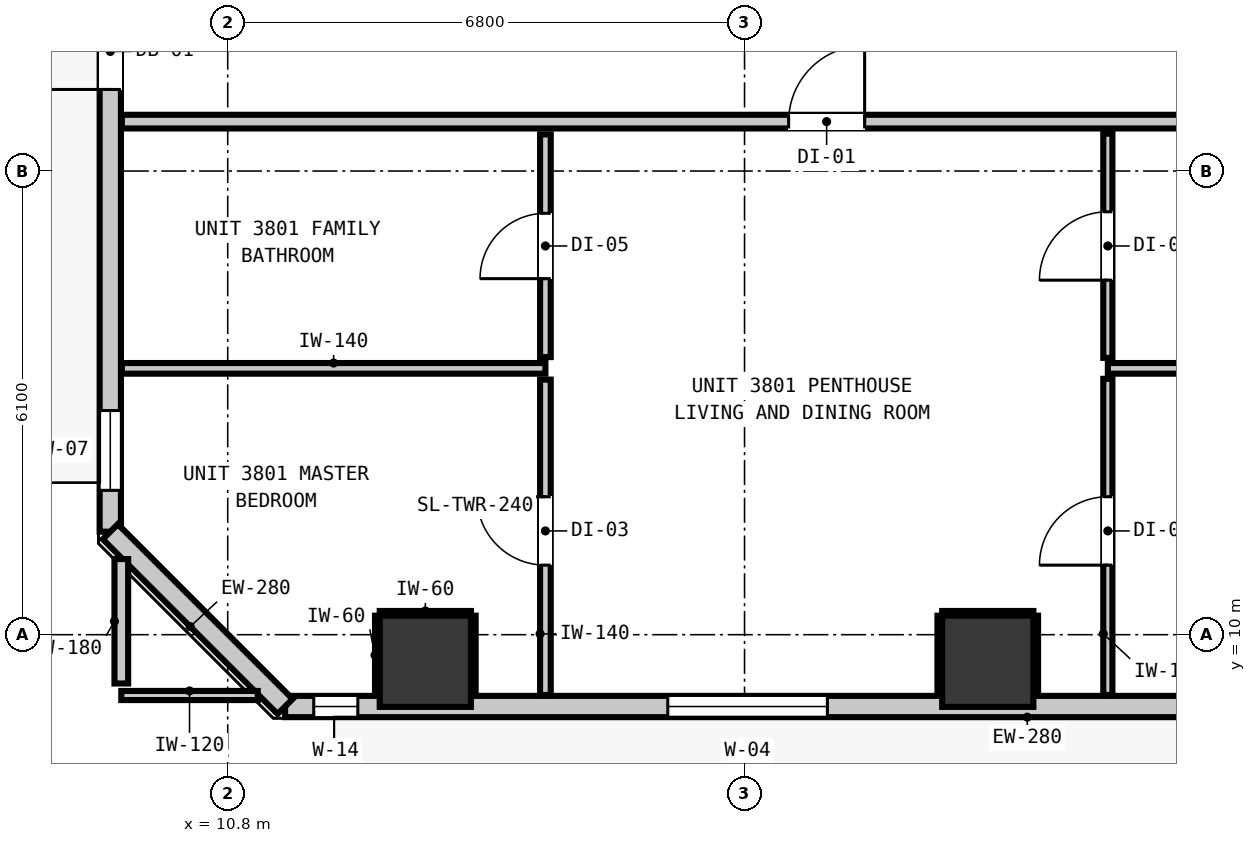
"""IFC4 building model, lengths in metres.
Left out: names, types, materials, properties, quantities, classifications, styles, units other than length and angle.
Written with IfcOpenShell. Run it as: python <this file> out.ifc"""

import sys

from ifc_helpers import new_model, si_unit, direction, frame, frame_2d, origin, origin_2d, place, context, subcontext, project, spatial, rectangle, extrude, element, fill, save


model = new_model("IFC4")
c1 = context("Model", 3, precision=1e-05, world=origin(), true_north=direction((0.0, 1.0)))
c2 = subcontext(c1, "Body", "Model", "MODEL_VIEW")
j1 = project(units=[si_unit("LENGTHUNIT", "METRE"), si_unit("PLANEANGLEUNIT", "RADIAN")], contexts=[c1])
p1 = place(None, origin())
s1 = spatial("IfcSite", under=j1, at=p1, CompositionType="ELEMENT")
p2 = place(p1, origin())
s2 = spatial("IfcBuilding", under=s1, at=p2, CompositionType="ELEMENT")
p3 = place(p2, frame((0.0, 0.0, 132.64)))
s3 = spatial("IfcBuildingStorey", under=s2, at=p3, CompositionType="ELEMENT", Elevation=132.64)
for number, where, z_axis, x_axis in (
    (1, (13.4, 9.65, 0.0), (0.0, 0.0, 1.0), (1.0, 0.0, 0.0)),
    (2, (20.8, 9.65, 0.0), (0.0, 0.0, 1.0), (1.0, 0.0, 0.0)),
):
    element("IfcColumn", number, at=place(p3, frame(where, z_axis=z_axis, x_axis=x_axis)), inside=s3, PredefinedType="COLUMN", context=c2, shape_type="SweptSolid", body=[
        extrude(rectangle(XDim=1.2, YDim=1.2, at=origin_2d()), origin(), (0.0, 0.0, 1.0), 3.32),
    ])
p4 = place(p3, frame((9.255, 11.355, 0.0), z_axis=(0.0, 0.0, 1.0), x_axis=(0.0, 1.0, 0.0)))
e3 = element("IfcWall", 3, at=p4, inside=s3, PredefinedType="STANDARD", context=c2, shape_type="SweptSolid", body=[
    extrude(rectangle(XDim=32.29, YDim=0.28, at=frame_2d((16.145, 0.0))), origin(), (0.0, 0.0, 1.0), 3.08),
])
p5 = place(p4, frame((5.818, 0.0, 0.0)))
e4 = element("IfcOpeningElement", 4, at=p5, cuts=e3, PredefinedType="OPENING", context=c2, shape_type="SweptSolid", body=[
    extrude(rectangle(XDim=1.0, YDim=2.15, at=frame_2d((0.5, 1.075))), frame((0.0, 0.15, 0.0), z_axis=(0.0, -1.0, 0.0), x_axis=(1.0, 0.0, 0.0)), (0.0, 0.0, 1.0), 0.3),
])
p6 = place(p4, frame((0.544, 0.0, 0.85)))
e5 = element("IfcOpeningElement", 5, at=p6, cuts=e3, PredefinedType="OPENING", context=c2, shape_type="SweptSolid", body=[
    extrude(rectangle(XDim=1.05, YDim=1.65, at=frame_2d((0.525, 0.825))), frame((0.0, 0.15, 0.0), z_axis=(0.0, -1.0, 0.0), x_axis=(1.0, 0.0, 0.0)), (0.0, 0.0, 1.0), 0.3),
])
p7 = place(p3, frame((46.645, 9.055, 0.0), z_axis=(0.0, 0.0, 1.0), x_axis=(-1.0, 0.0, 0.0)))
e6 = element("IfcWall", 6, at=p7, inside=s3, PredefinedType="STANDARD", context=c2, shape_type="SweptSolid", body=[
    extrude(rectangle(XDim=35.09, YDim=0.28, at=frame_2d((17.545, 0.0))), origin(), (0.0, 0.0, 1.0), 3.08),
])
p8 = place(p7, frame((0.904, 0.0, 0.0)))
e7 = element("IfcOpeningElement", 7, at=p8, cuts=e6, PredefinedType="OPENING", context=c2, shape_type="SweptSolid", body=[
    extrude(rectangle(XDim=1.0, YDim=2.15, at=frame_2d((0.5, 1.075))), frame((0.0, 0.15, 0.0), z_axis=(0.0, -1.0, 0.0), x_axis=(1.0, 0.0, 0.0)), (0.0, 0.0, 1.0), 0.3),
])
p9 = place(p7, frame((27.955, 0.0, 0.85)))
e8 = element("IfcOpeningElement", 8, at=p9, cuts=e6, PredefinedType="OPENING", context=c2, shape_type="SweptSolid", body=[
    extrude(rectangle(XDim=2.1, YDim=1.9, at=frame_2d((1.05, 0.95))), frame((0.0, 0.15, 0.0), z_axis=(0.0, -1.0, 0.0), x_axis=(1.0, 0.0, 0.0)), (0.0, 0.0, 1.0), 0.3),
])
p10 = place(p7, frame((34.133, 0.0, 0.85)))
e9 = element("IfcOpeningElement", 9, at=p10, cuts=e6, PredefinedType="OPENING", context=c2, shape_type="SweptSolid", body=[
    extrude(rectangle(XDim=0.58, YDim=1.5, at=frame_2d((0.29, 0.75))), frame((0.0, 0.15, 0.0), z_axis=(0.0, -1.0, 0.0), x_axis=(1.0, 0.0, 0.0)), (0.0, 0.0, 1.0), 0.3),
])
p11 = place(p7, frame((20.595, 0.0, 0.85)))
e10 = element("IfcOpeningElement", 10, at=p11, cuts=e6, PredefinedType="OPENING", context=c2, shape_type="SweptSolid", body=[
    extrude(rectangle(XDim=2.1, YDim=1.9, at=frame_2d((1.05, 0.95))), frame((0.0, 0.15, 0.0), z_axis=(0.0, -1.0, 0.0), x_axis=(1.0, 0.0, 0.0)), (0.0, 0.0, 1.0), 0.3),
])
p12 = place(p7, frame((15.248, 0.0, 0.85)))
e11 = element("IfcOpeningElement", 11, at=p12, cuts=e6, PredefinedType="OPENING", context=c2, shape_type="SweptSolid", body=[
    extrude(rectangle(XDim=1.05, YDim=1.65, at=frame_2d((0.525, 0.825))), frame((0.0, 0.15, 0.0), z_axis=(0.0, -1.0, 0.0), x_axis=(1.0, 0.0, 0.0)), (0.0, 0.0, 1.0), 0.3),
])
p13 = place(p7, frame((4.752, 0.0, 0.85)))
e12 = element("IfcOpeningElement", 12, at=p13, cuts=e6, PredefinedType="OPENING", context=c2, shape_type="SweptSolid", body=[
    extrude(rectangle(XDim=2.1, YDim=1.9, at=frame_2d((1.05, 0.95))), frame((0.0, 0.15, 0.0), z_axis=(0.0, -1.0, 0.0), x_axis=(1.0, 0.0, 0.0)), (0.0, 0.0, 1.0), 0.3),
])
p14 = place(p7, frame((11.573, 0.0, 0.85)))
e13 = element("IfcOpeningElement", 13, at=p14, cuts=e6, PredefinedType="OPENING", context=c2, shape_type="SweptSolid", body=[
    extrude(rectangle(XDim=2.1, YDim=1.9, at=frame_2d((1.05, 0.95))), frame((0.0, 0.15, 0.0), z_axis=(0.0, -1.0, 0.0), x_axis=(1.0, 0.0, 0.0)), (0.0, 0.0, 1.0), 0.3),
])
p15 = place(p3, frame((11.555, 9.055, 0.0), z_axis=(0.0, 0.0, 1.0), x_axis=(-0.707106781187, 0.707106781187, 0.0)))
e14 = element("IfcWall", 14, at=p15, inside=s3, PredefinedType="STANDARD", context=c2, shape_type="SweptSolid", body=[
    extrude(rectangle(XDim=3.253, YDim=0.28, at=frame_2d((1.626, 0.0))), origin(), (0.0, 0.0, 1.0), 3.08),
])
p16 = place(p3, frame((9.407, 16.75, 0.0), z_axis=(0.0, 0.0, 1.0), x_axis=(1.0, 0.0, 0.0)))
e15 = element("IfcWall", 15, at=p16, inside=s3, PredefinedType="PARTITIONING", context=c2, shape_type="SweptSolid", body=[
    extrude(rectangle(XDim=39.386, YDim=0.18, at=frame_2d((19.693, 0.0))), origin(), (0.0, 0.0, 1.0), 3.08),
])
p17 = place(p16, frame((8.773, 0.0, 0.0)))
e16 = element("IfcOpeningElement", 16, at=p17, cuts=e15, PredefinedType="OPENING", context=c2, shape_type="SweptSolid", body=[
    extrude(rectangle(XDim=1.0, YDim=2.15, at=frame_2d((0.5, 1.075))), frame((0.0, 0.1, 0.0), z_axis=(0.0, -1.0, 0.0), x_axis=(1.0, 0.0, 0.0)), (0.0, 0.0, 1.0), 0.2),
])
p18 = place(p16, frame((30.936, 0.0, 0.0)))
e17 = element("IfcOpeningElement", 17, at=p18, cuts=e15, PredefinedType="OPENING", context=c2, shape_type="SweptSolid", body=[
    extrude(rectangle(XDim=1.0, YDim=2.15, at=frame_2d((0.5, 1.075))), frame((0.0, 0.1, 0.0), z_axis=(0.0, -1.0, 0.0), x_axis=(1.0, 0.0, 0.0)), (0.0, 0.0, 1.0), 0.2),
])
p19 = place(p3, frame((9.407, 13.504, 0.0), z_axis=(0.0, 0.0, 1.0), x_axis=(1.0, 0.0, 0.0)))
e18 = element("IfcWall", 18, at=p19, inside=s3, PredefinedType="PARTITIONING", context=c2, shape_type="SweptSolid", body=[
    extrude(rectangle(XDim=5.573, YDim=0.14, at=frame_2d((2.787, 0.0))), origin(), (0.0, 0.0, 1.0), 3.08),
])
p20 = place(p3, frame((22.38, 13.504, 0.0), z_axis=(0.0, 0.0, 1.0), x_axis=(1.0, 0.0, 0.0)))
e19 = element("IfcWall", 19, at=p20, inside=s3, PredefinedType="PARTITIONING", context=c2, shape_type="SweptSolid", body=[
    extrude(rectangle(XDim=15.7, YDim=0.14, at=frame_2d((7.85, 0.0))), origin(), (0.0, 0.0, 1.0), 3.08),
])
p21 = place(p3, frame((9.4, 9.2, 0.0), z_axis=(0.0, 0.0, 1.0), x_axis=(1.0, 0.0, 0.0)))
e20 = element("IfcWall", 20, at=p21, inside=s3, PredefinedType="PARTITIONING", context=c2, shape_type="SweptSolid", body=[
    extrude(rectangle(XDim=1.795, YDim=0.12, at=frame_2d((0.897, 0.0))), origin(), (0.0, 0.0, 1.0), 3.08),
])
p22 = place(p3, frame((9.4, 9.358, 0.0), z_axis=(0.0, 0.0, 1.0), x_axis=(0.0, 1.0, 0.0)))
e21 = element("IfcWall", 21, at=p22, inside=s3, PredefinedType="PARTITIONING", context=c2, shape_type="SweptSolid", body=[
    extrude(rectangle(XDim=1.637, YDim=0.18, at=frame_2d((0.819, 0.0))), origin(), (0.0, 0.0, 1.0), 3.08),
])
p23 = place(p3, frame((14.98, 9.207, 0.0), z_axis=(0.0, 0.0, 1.0), x_axis=(0.0, 1.0, 0.0)))
e22 = element("IfcWall", 22, at=p23, inside=s3, PredefinedType="PARTITIONING", context=c2, shape_type="SweptSolid", body=[
    extrude(rectangle(XDim=4.149, YDim=0.14, at=frame_2d((2.074, 0.0))), origin(), (0.0, 0.0, 1.0), 3.08),
])
p24 = place(p23, frame((1.708, 0.0, 0.0)))
e23 = element("IfcOpeningElement", 23, at=p24, cuts=e22, PredefinedType="OPENING", context=c2, shape_type="SweptSolid", body=[
    extrude(rectangle(XDim=0.9, YDim=2.1, at=frame_2d((0.45, 1.05))), frame((0.0, 0.08, 0.0), z_axis=(0.0, -1.0, 0.0), x_axis=(1.0, 0.0, 0.0)), (0.0, 0.0, 1.0), 0.16),
])
p25 = place(p3, frame((14.98, 13.652, 0.0), z_axis=(0.0, 0.0, 1.0), x_axis=(0.0, 1.0, 0.0)))
e24 = element("IfcWall", 24, at=p25, inside=s3, PredefinedType="PARTITIONING", context=c2, shape_type="SweptSolid", body=[
    extrude(rectangle(XDim=2.93, YDim=0.14, at=frame_2d((1.465, 0.0))), origin(), (0.0, 0.0, 1.0), 3.08),
])
p26 = place(p25, frame((1.032, 0.0, 0.0)))
e25 = element("IfcOpeningElement", 25, at=p26, cuts=e24, PredefinedType="OPENING", context=c2, shape_type="SweptSolid", body=[
    extrude(rectangle(XDim=0.86, YDim=2.02, at=frame_2d((0.43, 1.01))), frame((0.0, 0.08, 0.0), z_axis=(0.0, -1.0, 0.0), x_axis=(1.0, 0.0, 0.0)), (0.0, 0.0, 1.0), 0.16),
])
p27 = place(p3, frame((22.38, 9.207, 0.0), z_axis=(0.0, 0.0, 1.0), x_axis=(0.0, 1.0, 0.0)))
e26 = element("IfcWall", 26, at=p27, inside=s3, PredefinedType="PARTITIONING", context=c2, shape_type="SweptSolid", body=[
    extrude(rectangle(XDim=4.159, YDim=0.12, at=frame_2d((2.08, 0.0))), origin(), (0.0, 0.0, 1.0), 3.08),
])
p28 = place(p27, frame((1.708, 0.0, 0.0)))
e27 = element("IfcOpeningElement", 27, at=p28, cuts=e26, PredefinedType="OPENING", context=c2, shape_type="SweptSolid", body=[
    extrude(rectangle(XDim=0.9, YDim=2.1, at=frame_2d((0.45, 1.05))), frame((0.0, 0.07, 0.0), z_axis=(0.0, -1.0, 0.0), x_axis=(1.0, 0.0, 0.0)), (0.0, 0.0, 1.0), 0.14),
])
p29 = place(p3, frame((22.38, 13.642, 0.0), z_axis=(0.0, 0.0, 1.0), x_axis=(0.0, 1.0, 0.0)))
e28 = element("IfcWall", 28, at=p29, inside=s3, PredefinedType="PARTITIONING", context=c2, shape_type="SweptSolid", body=[
    extrude(rectangle(XDim=2.95, YDim=0.12, at=frame_2d((1.475, 0.0))), origin(), (0.0, 0.0, 1.0), 3.08),
])
p30 = place(p29, frame((1.022, 0.0, 0.0)))
e29 = element("IfcOpeningElement", 29, at=p30, cuts=e28, PredefinedType="OPENING", context=c2, shape_type="SweptSolid", body=[
    extrude(rectangle(XDim=0.9, YDim=2.1, at=frame_2d((0.45, 1.05))), frame((0.0, 0.07, 0.0), z_axis=(0.0, -1.0, 0.0), x_axis=(1.0, 0.0, 0.0)), (0.0, 0.0, 1.0), 0.14),
])
p31 = place(p3, frame((12.8, 10.282, 0.0), z_axis=(0.0, 0.0, 1.0), x_axis=(1.0, 0.0, 0.0)))
e30 = element("IfcWall", 30, at=p31, inside=s3, PredefinedType="PARTITIONING", context=c2, shape_type="SweptSolid", body=[
    extrude(rectangle(XDim=1.2, YDim=0.06, at=frame_2d((0.6, 0.0))), origin(), (0.0, 0.0, 1.0), 1.45),
])
for number, where, z_axis, x_axis in (
    (31, (12.768, 9.21, 0.0), (0.0, 0.0, 1.0), (0.0, 1.0, 0.0)),
    (32, (14.032, 9.21, 0.0), (0.0, 0.0, 1.0), (0.0, 1.0, 0.0)),
):
    element("IfcWall", number, at=place(p3, frame(where, z_axis=z_axis, x_axis=x_axis)), inside=s3, PredefinedType="PARTITIONING", context=c2, shape_type="SweptSolid", body=[
        extrude(rectangle(XDim=1.04, YDim=0.06, at=frame_2d((0.52, 0.0))), origin(), (0.0, 0.0, 1.0), 1.45),
    ])
p32 = place(p3, frame((20.2, 10.282, 0.0), z_axis=(0.0, 0.0, 1.0), x_axis=(1.0, 0.0, 0.0)))
e33 = element("IfcWall", 33, at=p32, inside=s3, PredefinedType="PARTITIONING", context=c2, shape_type="SweptSolid", body=[
    extrude(rectangle(XDim=1.2, YDim=0.06, at=frame_2d((0.6, 0.0))), origin(), (0.0, 0.0, 1.0), 1.45),
])
for number, where, z_axis, x_axis in (
    (34, (20.168, 9.21, 0.0), (0.0, 0.0, 1.0), (0.0, 1.0, 0.0)),
    (35, (21.432, 9.21, 0.0), (0.0, 0.0, 1.0), (0.0, 1.0, 0.0)),
):
    element("IfcWall", number, at=place(p3, frame(where, z_axis=z_axis, x_axis=x_axis)), inside=s3, PredefinedType="PARTITIONING", context=c2, shape_type="SweptSolid", body=[
        extrude(rectangle(XDim=1.04, YDim=0.06, at=frame_2d((0.52, 0.0))), origin(), (0.0, 0.0, 1.0), 1.45),
    ])
p33 = place(p5, origin())
e36 = element("IfcDoor", 36, at=p33, inside=s3, OperationType="SINGLE_SWING_LEFT", PredefinedType="DOOR", context=c2, shape_type="SweptSolid", body=[
    extrude(rectangle(XDim=1.0, YDim=2.15, at=frame_2d((0.5, 1.075))), frame((0.0, 0.025, 0.0), z_axis=(0.0, -1.0, 0.0), x_axis=(1.0, 0.0, 0.0)), (0.0, 0.0, 1.0), 0.05),
])
fill(e4, e36)
p34 = place(p6, origin())
e37 = element("IfcWindow", 37, at=p34, inside=s3, PartitioningType="SINGLE_PANEL", PredefinedType="WINDOW", context=c2, shape_type="SweptSolid", body=[
    extrude(rectangle(XDim=1.05, YDim=1.65, at=frame_2d((0.525, 0.825))), frame((0.0, 0.03, 0.0), z_axis=(0.0, -1.0, 0.0), x_axis=(1.0, 0.0, 0.0)), (0.0, 0.0, 1.0), 0.06),
])
fill(e5, e37)
p35 = place(p9, origin())
e38 = element("IfcWindow", 38, at=p35, inside=s3, PartitioningType="SINGLE_PANEL", PredefinedType="WINDOW", context=c2, shape_type="SweptSolid", body=[
    extrude(rectangle(XDim=2.1, YDim=1.9, at=frame_2d((1.05, 0.95))), frame((0.0, 0.03, 0.0), z_axis=(0.0, -1.0, 0.0), x_axis=(1.0, 0.0, 0.0)), (0.0, 0.0, 1.0), 0.06),
])
fill(e8, e38)
p36 = place(p10, origin())
e39 = element("IfcWindow", 39, at=p36, inside=s3, PartitioningType="SINGLE_PANEL", PredefinedType="WINDOW", context=c2, shape_type="SweptSolid", body=[
    extrude(rectangle(XDim=0.58, YDim=1.5, at=frame_2d((0.29, 0.75))), frame((0.0, 0.03, 0.0), z_axis=(0.0, -1.0, 0.0), x_axis=(1.0, 0.0, 0.0)), (0.0, 0.0, 1.0), 0.06),
])
fill(e9, e39)
p37 = place(p17, origin())
e40 = element("IfcDoor", 40, at=p37, inside=s3, OperationType="SINGLE_SWING_RIGHT", PredefinedType="DOOR", context=c2, shape_type="SweptSolid", body=[
    extrude(rectangle(XDim=1.0, YDim=2.15, at=frame_2d((0.5, 1.075))), frame((0.0, 0.025, 0.0), z_axis=(0.0, -1.0, 0.0), x_axis=(1.0, 0.0, 0.0)), (0.0, 0.0, 1.0), 0.05),
])
fill(e16, e40)
p38 = place(p26, origin())
e41 = element("IfcDoor", 41, at=p38, inside=s3, OperationType="SINGLE_SWING_LEFT", PredefinedType="DOOR", context=c2, shape_type="SweptSolid", body=[
    extrude(rectangle(XDim=0.86, YDim=2.02, at=frame_2d((0.43, 1.01))), frame((0.0, 0.025, 0.0), z_axis=(0.0, -1.0, 0.0), x_axis=(1.0, 0.0, 0.0)), (0.0, 0.0, 1.0), 0.05),
])
fill(e25, e41)
p39 = place(p24, origin())
e42 = element("IfcDoor", 42, at=p39, inside=s3, OperationType="SINGLE_SWING_RIGHT", PredefinedType="DOOR", context=c2, shape_type="SweptSolid", body=[
    extrude(rectangle(XDim=0.9, YDim=2.1, at=frame_2d((0.45, 1.05))), frame((0.0, 0.025, 0.0), z_axis=(0.0, -1.0, 0.0), x_axis=(1.0, 0.0, 0.0)), (0.0, 0.0, 1.0), 0.05),
])
fill(e23, e42)
p40 = place(p30, origin())
e43 = element("IfcDoor", 43, at=p40, inside=s3, OperationType="SINGLE_SWING_LEFT", PredefinedType="DOOR", context=c2, shape_type="SweptSolid", body=[
    extrude(rectangle(XDim=0.9, YDim=2.1, at=frame_2d((0.45, 1.05))), frame((0.0, 0.025, 0.0), z_axis=(0.0, -1.0, 0.0), x_axis=(1.0, 0.0, 0.0)), (0.0, 0.0, 1.0), 0.05),
])
fill(e29, e43)
p41 = place(p28, origin())
e44 = element("IfcDoor", 44, at=p41, inside=s3, OperationType="SINGLE_SWING_LEFT", PredefinedType="DOOR", context=c2, shape_type="SweptSolid", body=[
    extrude(rectangle(XDim=0.9, YDim=2.1, at=frame_2d((0.45, 1.05))), frame((0.0, 0.025, 0.0), z_axis=(0.0, -1.0, 0.0), x_axis=(1.0, 0.0, 0.0)), (0.0, 0.0, 1.0), 0.05),
])
fill(e27, e44)
save(model, sys.argv[1])
